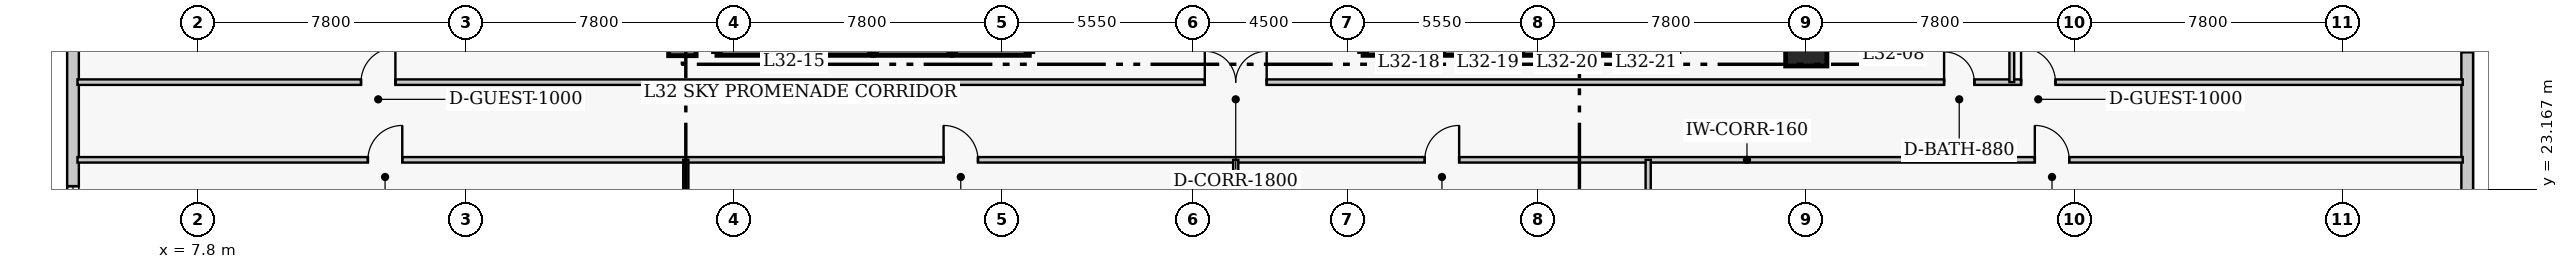
"""IFC4 building model, lengths in metres.
Left out: names, types, materials, properties, quantities, classifications, styles, units other than length and angle.
Written with IfcOpenShell. Run it as: python <this file> out.ifc"""

import sys

from ifc_helpers import new_model, si_unit, direction, frame, frame_2d, origin, origin_2d, place, context, subcontext, project, spatial, rectangle, extrude, element, fill, save


model = new_model("IFC4")
c1 = context("Model", 3, precision=1e-05, world=origin(), true_north=direction((0.0, 1.0)))
c2 = subcontext(c1, "Body", "Model", "MODEL_VIEW")
j1 = project(units=[si_unit("LENGTHUNIT", "METRE"), si_unit("PLANEANGLEUNIT", "RADIAN")], contexts=[c1])
p1 = place(None, origin())
s1 = spatial("IfcSite", under=j1, at=p1, CompositionType="ELEMENT")
p2 = place(p1, origin())
s2 = spatial("IfcBuilding", under=s1, at=p2, CompositionType="ELEMENT")
p3 = place(p2, frame((0.0, 0.0, 129.8)))
s3 = spatial("IfcBuildingStorey", under=s2, at=p3, CompositionType="ELEMENT", Elevation=129.8)
for number, where, z_axis, x_axis in (
    (1, (21.9, 27.05, 0.0), (0.0, 0.0, 1.0), (0.0, 1.0, 0.0)),
    (2, (56.92, 27.05, 0.0), (0.0, 0.0, 1.0), (0.0, 1.0, 0.0)),
):
    element("IfcWall", number, at=place(p3, frame(where, z_axis=z_axis, x_axis=x_axis)), inside=s3, PredefinedType="SHEAR", context=c2, shape_type="SweptSolid", body=[
        extrude(rectangle(XDim=13.67, YDim=0.8, at=frame_2d((6.835, 0.0))), origin(), (0.0, 0.0, 1.0), 4.8),
    ])
p4 = place(p3, frame((54.6, 27.35, 0.0), z_axis=(0.0, 0.0, 1.0), x_axis=(1.0, 0.0, 0.0)))
e3 = element("IfcColumn", 3, at=p4, inside=s3, PredefinedType="COLUMN", context=c2, shape_type="SweptSolid", body=[
    extrude(rectangle(XDim=1.2, YDim=1.2, at=origin_2d()), origin(), (0.0, 0.0, 1.0), 4.8),
])
p5 = place(p3, frame((73.83, 13.83, 0.0), z_axis=(0.0, 0.0, 1.0), x_axis=(0.0, 1.0, 0.0)))
e4 = element("IfcWall", 4, at=p5, inside=s3, PredefinedType="SOLIDWALL", context=c2, shape_type="SweptSolid", body=[
    extrude(rectangle(XDim=31.94, YDim=0.34, at=frame_2d((15.97, 0.0))), origin(), (0.0, 0.0, 1.0), 4.55),
])
p6 = place(p5, frame((0.696, 0.0, 0.65)))
e5 = element("IfcOpeningElement", 5, at=p6, cuts=e4, PredefinedType="OPENING", context=c2, shape_type="SweptSolid", body=[
    extrude(rectangle(XDim=2.6, YDim=2.2, at=frame_2d((1.3, 1.1))), frame((0.0, 0.18, 0.0), z_axis=(0.0, -1.0, 0.0), x_axis=(1.0, 0.0, 0.0)), (0.0, 0.0, 1.0), 0.36),
])
p7 = place(p5, frame((4.689, 0.0, 0.65)))
e6 = element("IfcOpeningElement", 6, at=p7, cuts=e4, PredefinedType="OPENING", context=c2, shape_type="SweptSolid", body=[
    extrude(rectangle(XDim=2.6, YDim=2.2, at=frame_2d((1.3, 1.1))), frame((0.0, 0.18, 0.0), z_axis=(0.0, -1.0, 0.0), x_axis=(1.0, 0.0, 0.0)), (0.0, 0.0, 1.0), 0.36),
])
p8 = place(p5, frame((13.324, 0.0, 0.65)))
e7 = element("IfcOpeningElement", 7, at=p8, cuts=e4, PredefinedType="OPENING", context=c2, shape_type="SweptSolid", body=[
    extrude(rectangle(XDim=2.6, YDim=2.2, at=frame_2d((1.3, 1.1))), frame((0.0, 0.18, 0.0), z_axis=(0.0, -1.0, 0.0), x_axis=(1.0, 0.0, 0.0)), (0.0, 0.0, 1.0), 0.36),
])
p9 = place(p5, frame((16.666, 0.0, 0.65)))
e8 = element("IfcOpeningElement", 8, at=p9, cuts=e4, PredefinedType="OPENING", context=c2, shape_type="SweptSolid", body=[
    extrude(rectangle(XDim=2.6, YDim=2.2, at=frame_2d((1.3, 1.1))), frame((0.0, 0.18, 0.0), z_axis=(0.0, -1.0, 0.0), x_axis=(1.0, 0.0, 0.0)), (0.0, 0.0, 1.0), 0.36),
])
p10 = place(p5, frame((20.659, 0.0, 0.65)))
e9 = element("IfcOpeningElement", 9, at=p10, cuts=e4, PredefinedType="OPENING", context=c2, shape_type="SweptSolid", body=[
    extrude(rectangle(XDim=2.6, YDim=2.2, at=frame_2d((1.3, 1.1))), frame((0.0, 0.18, 0.0), z_axis=(0.0, -1.0, 0.0), x_axis=(1.0, 0.0, 0.0)), (0.0, 0.0, 1.0), 0.36),
])
p11 = place(p5, frame((24.651, 0.0, 0.65)))
e10 = element("IfcOpeningElement", 10, at=p11, cuts=e4, PredefinedType="OPENING", context=c2, shape_type="SweptSolid", body=[
    extrude(rectangle(XDim=2.6, YDim=2.2, at=frame_2d((1.3, 1.1))), frame((0.0, 0.18, 0.0), z_axis=(0.0, -1.0, 0.0), x_axis=(1.0, 0.0, 0.0)), (0.0, 0.0, 1.0), 0.36),
])
p12 = place(p5, frame((28.644, 0.0, 0.65)))
e11 = element("IfcOpeningElement", 11, at=p12, cuts=e4, PredefinedType="OPENING", context=c2, shape_type="SweptSolid", body=[
    extrude(rectangle(XDim=2.6, YDim=2.2, at=frame_2d((1.3, 1.1))), frame((0.0, 0.18, 0.0), z_axis=(0.0, -1.0, 0.0), x_axis=(1.0, 0.0, 0.0)), (0.0, 0.0, 1.0), 0.36),
])
p13 = place(p3, frame((4.17, 40.57, 0.0), z_axis=(0.0, 0.0, 1.0), x_axis=(0.0, -1.0, 0.0)))
e12 = element("IfcWall", 12, at=p13, inside=s3, PredefinedType="SOLIDWALL", context=c2, shape_type="SweptSolid", body=[
    extrude(rectangle(XDim=31.94, YDim=0.34, at=frame_2d((15.97, 0.0))), origin(), (0.0, 0.0, 1.0), 4.55),
])
p14 = place(p13, frame((0.696, 0.0, 0.65)))
e13 = element("IfcOpeningElement", 13, at=p14, cuts=e12, PredefinedType="OPENING", context=c2, shape_type="SweptSolid", body=[
    extrude(rectangle(XDim=2.6, YDim=2.2, at=frame_2d((1.3, 1.1))), frame((0.0, 0.18, 0.0), z_axis=(0.0, -1.0, 0.0), x_axis=(1.0, 0.0, 0.0)), (0.0, 0.0, 1.0), 0.36),
])
p15 = place(p13, frame((4.689, 0.0, 0.65)))
e14 = element("IfcOpeningElement", 14, at=p15, cuts=e12, PredefinedType="OPENING", context=c2, shape_type="SweptSolid", body=[
    extrude(rectangle(XDim=2.6, YDim=2.2, at=frame_2d((1.3, 1.1))), frame((0.0, 0.18, 0.0), z_axis=(0.0, -1.0, 0.0), x_axis=(1.0, 0.0, 0.0)), (0.0, 0.0, 1.0), 0.36),
])
p16 = place(p13, frame((8.681, 0.0, 0.65)))
e15 = element("IfcOpeningElement", 15, at=p16, cuts=e12, PredefinedType="OPENING", context=c2, shape_type="SweptSolid", body=[
    extrude(rectangle(XDim=2.6, YDim=2.2, at=frame_2d((1.3, 1.1))), frame((0.0, 0.18, 0.0), z_axis=(0.0, -1.0, 0.0), x_axis=(1.0, 0.0, 0.0)), (0.0, 0.0, 1.0), 0.36),
])
p17 = place(p13, frame((17.316, 0.0, 0.65)))
e16 = element("IfcOpeningElement", 16, at=p17, cuts=e12, PredefinedType="OPENING", context=c2, shape_type="SweptSolid", body=[
    extrude(rectangle(XDim=2.6, YDim=2.2, at=frame_2d((1.3, 1.1))), frame((0.0, 0.18, 0.0), z_axis=(0.0, -1.0, 0.0), x_axis=(1.0, 0.0, 0.0)), (0.0, 0.0, 1.0), 0.36),
])
p18 = place(p13, frame((20.659, 0.0, 0.65)))
e17 = element("IfcOpeningElement", 17, at=p18, cuts=e12, PredefinedType="OPENING", context=c2, shape_type="SweptSolid", body=[
    extrude(rectangle(XDim=2.6, YDim=2.2, at=frame_2d((1.3, 1.1))), frame((0.0, 0.18, 0.0), z_axis=(0.0, -1.0, 0.0), x_axis=(1.0, 0.0, 0.0)), (0.0, 0.0, 1.0), 0.36),
])
p19 = place(p13, frame((24.651, 0.0, 0.65)))
e18 = element("IfcOpeningElement", 18, at=p19, cuts=e12, PredefinedType="OPENING", context=c2, shape_type="SweptSolid", body=[
    extrude(rectangle(XDim=2.6, YDim=2.2, at=frame_2d((1.3, 1.1))), frame((0.0, 0.18, 0.0), z_axis=(0.0, -1.0, 0.0), x_axis=(1.0, 0.0, 0.0)), (0.0, 0.0, 1.0), 0.36),
])
p20 = place(p13, frame((28.644, 0.0, 0.65)))
e19 = element("IfcOpeningElement", 19, at=p20, cuts=e12, PredefinedType="OPENING", context=c2, shape_type="SweptSolid", body=[
    extrude(rectangle(XDim=2.6, YDim=2.2, at=frame_2d((1.3, 1.1))), frame((0.0, 0.18, 0.0), z_axis=(0.0, -1.0, 0.0), x_axis=(1.0, 0.0, 0.0)), (0.0, 0.0, 1.0), 0.36),
])
p21 = place(p3, frame((22.905, 27.17, 0.0), z_axis=(0.0, 0.0, 1.0), x_axis=(1.0, 0.0, 0.0)))
e20 = element("IfcWall", 20, at=p21, inside=s3, PredefinedType="SHEAR", context=c2, shape_type="SweptSolid", body=[
    extrude(rectangle(XDim=2.245, YDim=0.22, at=frame_2d((1.123, 0.0))), origin(), (0.0, 0.0, 1.0), 4.8),
])
for number, where, z_axis, x_axis in (
    (21, (25.15, 27.17, 0.0), (0.0, 0.0, 1.0), (1.0, 0.0, 0.0)),
    (22, (27.45, 27.17, 0.0), (0.0, 0.0, 1.0), (1.0, 0.0, 0.0)),
):
    element("IfcWall", number, at=place(p3, frame(where, z_axis=z_axis, x_axis=x_axis)), inside=s3, PredefinedType="SHEAR", context=c2, shape_type="SweptSolid", body=[
        extrude(rectangle(XDim=2.3, YDim=0.22, at=frame_2d((1.15, 0.0))), origin(), (0.0, 0.0, 1.0), 4.8),
    ])
p22 = place(p3, frame((29.75, 27.17, 0.0), z_axis=(0.0, 0.0, 1.0), x_axis=(1.0, 0.0, 0.0)))
e23 = element("IfcWall", 23, at=p22, inside=s3, PredefinedType="SHEAR", context=c2, shape_type="SweptSolid", body=[
    extrude(rectangle(XDim=2.245, YDim=0.22, at=frame_2d((1.123, 0.0))), origin(), (0.0, 0.0, 1.0), 4.8),
])
p23 = place(p3, frame((41.705, 27.17, 0.0), z_axis=(0.0, 0.0, 1.0), x_axis=(1.0, 0.0, 0.0)))
e24 = element("IfcWall", 24, at=p23, inside=s3, PredefinedType="SHEAR", context=c2, shape_type="SweptSolid", body=[
    extrude(rectangle(XDim=2.245, YDim=0.22, at=frame_2d((1.123, 0.0))), origin(), (0.0, 0.0, 1.0), 4.8),
])
for number, where, z_axis, x_axis in (
    (25, (43.95, 27.17, 0.0), (0.0, 0.0, 1.0), (1.0, 0.0, 0.0)),
    (26, (46.25, 27.17, 0.0), (0.0, 0.0, 1.0), (1.0, 0.0, 0.0)),
):
    element("IfcWall", number, at=place(p3, frame(where, z_axis=z_axis, x_axis=x_axis)), inside=s3, PredefinedType="SHEAR", context=c2, shape_type="SweptSolid", body=[
        extrude(rectangle(XDim=2.3, YDim=0.22, at=frame_2d((1.15, 0.0))), origin(), (0.0, 0.0, 1.0), 4.8),
    ])
p24 = place(p3, frame((48.55, 27.17, 0.0), z_axis=(0.0, 0.0, 1.0), x_axis=(1.0, 0.0, 0.0)))
e27 = element("IfcWall", 27, at=p24, inside=s3, PredefinedType="SHEAR", context=c2, shape_type="SweptSolid", body=[
    extrude(rectangle(XDim=2.245, YDim=0.22, at=frame_2d((1.123, 0.0))), origin(), (0.0, 0.0, 1.0), 4.8),
])
p25 = place(p3, frame((4.3, 24.02, 0.0), z_axis=(0.0, 0.0, 1.0), x_axis=(1.0, 0.0, 0.0)))
e28 = element("IfcWall", 28, at=p25, inside=s3, PredefinedType="PARTITIONING", context=c2, shape_type="SweptSolid", body=[
    extrude(rectangle(XDim=69.4, YDim=0.16, at=frame_2d((34.7, 0.0))), origin(), (0.0, 0.0, 1.0), 4.55),
])
p26 = place(p25, frame((8.45, 0.0, 0.0)))
e29 = element("IfcOpeningElement", 29, at=p26, cuts=e28, PredefinedType="OPENING", context=c2, shape_type="SweptSolid", body=[
    extrude(rectangle(XDim=1.0, YDim=2.15, at=frame_2d((0.5, 1.075))), frame((0.0, 0.09, 0.0), z_axis=(0.0, -1.0, 0.0), x_axis=(1.0, 0.0, 0.0)), (0.0, 0.0, 1.0), 0.18),
])
p27 = place(p25, frame((25.2, 0.0, 0.0)))
e30 = element("IfcOpeningElement", 30, at=p27, cuts=e28, PredefinedType="OPENING", context=c2, shape_type="SweptSolid", body=[
    extrude(rectangle(XDim=1.0, YDim=2.15, at=frame_2d((0.5, 1.075))), frame((0.0, 0.09, 0.0), z_axis=(0.0, -1.0, 0.0), x_axis=(1.0, 0.0, 0.0)), (0.0, 0.0, 1.0), 0.18),
])
p28 = place(p25, frame((39.2, 0.0, 0.0)))
e31 = element("IfcOpeningElement", 31, at=p28, cuts=e28, PredefinedType="OPENING", context=c2, shape_type="SweptSolid", body=[
    extrude(rectangle(XDim=1.0, YDim=2.15, at=frame_2d((0.5, 1.075))), frame((0.0, 0.09, 0.0), z_axis=(0.0, -1.0, 0.0), x_axis=(1.0, 0.0, 0.0)), (0.0, 0.0, 1.0), 0.18),
])
p29 = place(p25, frame((56.95, 0.0, 0.0)))
e32 = element("IfcOpeningElement", 32, at=p29, cuts=e28, PredefinedType="OPENING", context=c2, shape_type="SweptSolid", body=[
    extrude(rectangle(XDim=1.0, YDim=2.15, at=frame_2d((0.5, 1.075))), frame((0.0, 0.09, 0.0), z_axis=(0.0, -1.0, 0.0), x_axis=(1.0, 0.0, 0.0)), (0.0, 0.0, 1.0), 0.18),
])
p30 = place(p3, frame((4.3, 26.28, 0.0), z_axis=(0.0, 0.0, 1.0), x_axis=(1.0, 0.0, 0.0)))
e33 = element("IfcWall", 33, at=p30, inside=s3, PredefinedType="PARTITIONING", context=c2, shape_type="SweptSolid", body=[
    extrude(rectangle(XDim=69.4, YDim=0.16, at=frame_2d((34.7, 0.0))), origin(), (0.0, 0.0, 1.0), 4.55),
])
p31 = place(p30, frame((32.8, 0.0, 0.0)))
e34 = element("IfcOpeningElement", 34, at=p31, cuts=e33, PredefinedType="OPENING", context=c2, shape_type="SweptSolid", body=[
    extrude(rectangle(XDim=1.8, YDim=2.2, at=frame_2d((0.9, 1.1))), frame((0.0, 0.09, 0.0), z_axis=(0.0, -1.0, 0.0), x_axis=(1.0, 0.0, 0.0)), (0.0, 0.0, 1.0), 0.18),
])
p32 = place(p30, frame((8.25, 0.0, 0.0)))
e35 = element("IfcOpeningElement", 35, at=p32, cuts=e33, PredefinedType="OPENING", context=c2, shape_type="SweptSolid", body=[
    extrude(rectangle(XDim=1.0, YDim=2.15, at=frame_2d((0.5, 1.075))), frame((0.0, 0.09, 0.0), z_axis=(0.0, -1.0, 0.0), x_axis=(1.0, 0.0, 0.0)), (0.0, 0.0, 1.0), 0.18),
])
p33 = place(p30, frame((54.31, 0.0, 0.0)))
e36 = element("IfcOpeningElement", 36, at=p33, cuts=e33, PredefinedType="OPENING", context=c2, shape_type="SweptSolid", body=[
    extrude(rectangle(XDim=0.88, YDim=2.05, at=frame_2d((0.44, 1.025))), frame((0.0, 0.09, 0.0), z_axis=(0.0, -1.0, 0.0), x_axis=(1.0, 0.0, 0.0)), (0.0, 0.0, 1.0), 0.18),
])
p34 = place(p30, frame((56.55, 0.0, 0.0)))
e37 = element("IfcOpeningElement", 37, at=p34, cuts=e33, PredefinedType="OPENING", context=c2, shape_type="SweptSolid", body=[
    extrude(rectangle(XDim=1.0, YDim=2.15, at=frame_2d((0.5, 1.075))), frame((0.0, 0.09, 0.0), z_axis=(0.0, -1.0, 0.0), x_axis=(1.0, 0.0, 0.0)), (0.0, 0.0, 1.0), 0.18),
])
p35 = place(p3, frame((22.0, 4.62, 0.0), z_axis=(0.0, 0.0, 1.0), x_axis=(0.0, 1.0, 0.0)))
e38 = element("IfcWall", 38, at=p35, inside=s3, PredefinedType="PARTITIONING", context=c2, shape_type="SweptSolid", body=[
    extrude(rectangle(XDim=19.4, YDim=0.15, at=frame_2d((9.7, 0.0))), origin(), (0.0, 0.0, 1.0), 4.053),
])
p36 = place(p3, frame((38.0, 12.62, 0.0), z_axis=(0.0, 0.0, 1.0), x_axis=(0.0, 1.0, 0.0)))
e39 = element("IfcWall", 39, at=p36, inside=s3, PredefinedType="PARTITIONING", context=c2, shape_type="SweptSolid", body=[
    extrude(rectangle(XDim=11.4, YDim=0.15, at=frame_2d((5.7, 0.0))), origin(), (0.0, 0.0, 1.0), 4.55),
])
p37 = place(p3, frame((50.0, 9.82, 0.0), z_axis=(0.0, 0.0, 1.0), x_axis=(0.0, 1.0, 0.0)))
e40 = element("IfcWall", 40, at=p37, inside=s3, PredefinedType="PARTITIONING", context=c2, shape_type="SweptSolid", body=[
    extrude(rectangle(XDim=14.2, YDim=0.15, at=frame_2d((7.1, 0.0))), origin(), (0.0, 0.0, 1.0), 4.053),
])
p38 = place(p3, frame((60.58, 26.28, 0.0), z_axis=(0.0, 0.0, 1.0), x_axis=(0.0, 1.0, 0.0)))
e41 = element("IfcWall", 41, at=p38, inside=s3, PredefinedType="PLUMBINGWALL", context=c2, shape_type="SweptSolid", body=[
    extrude(rectangle(XDim=7.32, YDim=0.14, at=frame_2d((3.66, 0.0))), origin(), (0.0, 0.0, 1.0), 4.55),
])
p39 = place(p17, origin())
e42 = element("IfcWindow", 42, at=p39, inside=s3, PartitioningType="SINGLE_PANEL", PredefinedType="WINDOW", context=c2, shape_type="SweptSolid", body=[
    extrude(rectangle(XDim=2.6, YDim=2.2, at=frame_2d((1.3, 1.1))), frame((0.0, 0.03, 0.0), z_axis=(0.0, -1.0, 0.0), x_axis=(1.0, 0.0, 0.0)), (0.0, 0.0, 1.0), 0.06),
])
fill(e16, e42)
p40 = place(p31, origin())
e43 = element("IfcDoor", 43, at=p40, inside=s3, OperationType="DOUBLE_DOOR_SINGLE_SWING", PredefinedType="DOOR", context=c2, shape_type="SweptSolid", body=[
    extrude(rectangle(XDim=1.8, YDim=2.2, at=frame_2d((0.9, 1.1))), frame((0.0, 0.025, 0.0), z_axis=(0.0, -1.0, 0.0), x_axis=(1.0, 0.0, 0.0)), (0.0, 0.0, 1.0), 0.05),
])
fill(e34, e43)
p41 = place(p26, origin())
e44 = element("IfcDoor", 44, at=p41, inside=s3, OperationType="SINGLE_SWING_RIGHT", PredefinedType="DOOR", context=c2, shape_type="SweptSolid", body=[
    extrude(rectangle(XDim=1.0, YDim=2.15, at=frame_2d((0.5, 1.075))), frame((0.0, 0.025, 0.0), z_axis=(0.0, -1.0, 0.0), x_axis=(1.0, 0.0, 0.0)), (0.0, 0.0, 1.0), 0.05),
])
fill(e29, e44)
p42 = place(p27, origin())
e45 = element("IfcDoor", 45, at=p42, inside=s3, OperationType="SINGLE_SWING_LEFT", PredefinedType="DOOR", context=c2, shape_type="SweptSolid", body=[
    extrude(rectangle(XDim=1.0, YDim=2.15, at=frame_2d((0.5, 1.075))), frame((0.0, 0.025, 0.0), z_axis=(0.0, -1.0, 0.0), x_axis=(1.0, 0.0, 0.0)), (0.0, 0.0, 1.0), 0.05),
])
fill(e30, e45)
p43 = place(p28, origin())
e46 = element("IfcDoor", 46, at=p43, inside=s3, OperationType="SINGLE_SWING_RIGHT", PredefinedType="DOOR", context=c2, shape_type="SweptSolid", body=[
    extrude(rectangle(XDim=1.0, YDim=2.15, at=frame_2d((0.5, 1.075))), frame((0.0, 0.025, 0.0), z_axis=(0.0, -1.0, 0.0), x_axis=(1.0, 0.0, 0.0)), (0.0, 0.0, 1.0), 0.05),
])
fill(e31, e46)
p44 = place(p29, origin())
e47 = element("IfcDoor", 47, at=p44, inside=s3, OperationType="SINGLE_SWING_LEFT", PredefinedType="DOOR", context=c2, shape_type="SweptSolid", body=[
    extrude(rectangle(XDim=1.0, YDim=2.15, at=frame_2d((0.5, 1.075))), frame((0.0, 0.025, 0.0), z_axis=(0.0, -1.0, 0.0), x_axis=(1.0, 0.0, 0.0)), (0.0, 0.0, 1.0), 0.05),
])
fill(e32, e47)
p45 = place(p32, origin())
e48 = element("IfcDoor", 48, at=p45, inside=s3, OperationType="SINGLE_SWING_RIGHT", PredefinedType="DOOR", context=c2, shape_type="SweptSolid", body=[
    extrude(rectangle(XDim=1.0, YDim=2.15, at=frame_2d((0.5, 1.075))), frame((0.0, 0.025, 0.0), z_axis=(0.0, -1.0, 0.0), x_axis=(1.0, 0.0, 0.0)), (0.0, 0.0, 1.0), 0.05),
])
fill(e35, e48)
p46 = place(p33, origin())
e49 = element("IfcDoor", 49, at=p46, inside=s3, OperationType="SINGLE_SWING_LEFT", PredefinedType="DOOR", context=c2, shape_type="SweptSolid", body=[
    extrude(rectangle(XDim=0.88, YDim=2.05, at=frame_2d((0.44, 1.025))), frame((0.0, 0.025, 0.0), z_axis=(0.0, -1.0, 0.0), x_axis=(1.0, 0.0, 0.0)), (0.0, 0.0, 1.0), 0.05),
])
fill(e36, e49)
p47 = place(p34, origin())
e50 = element("IfcDoor", 50, at=p47, inside=s3, OperationType="SINGLE_SWING_LEFT", PredefinedType="DOOR", context=c2, shape_type="SweptSolid", body=[
    extrude(rectangle(XDim=1.0, YDim=2.15, at=frame_2d((0.5, 1.075))), frame((0.0, 0.025, 0.0), z_axis=(0.0, -1.0, 0.0), x_axis=(1.0, 0.0, 0.0)), (0.0, 0.0, 1.0), 0.05),
])
fill(e37, e50)
save(model, sys.argv[1])
